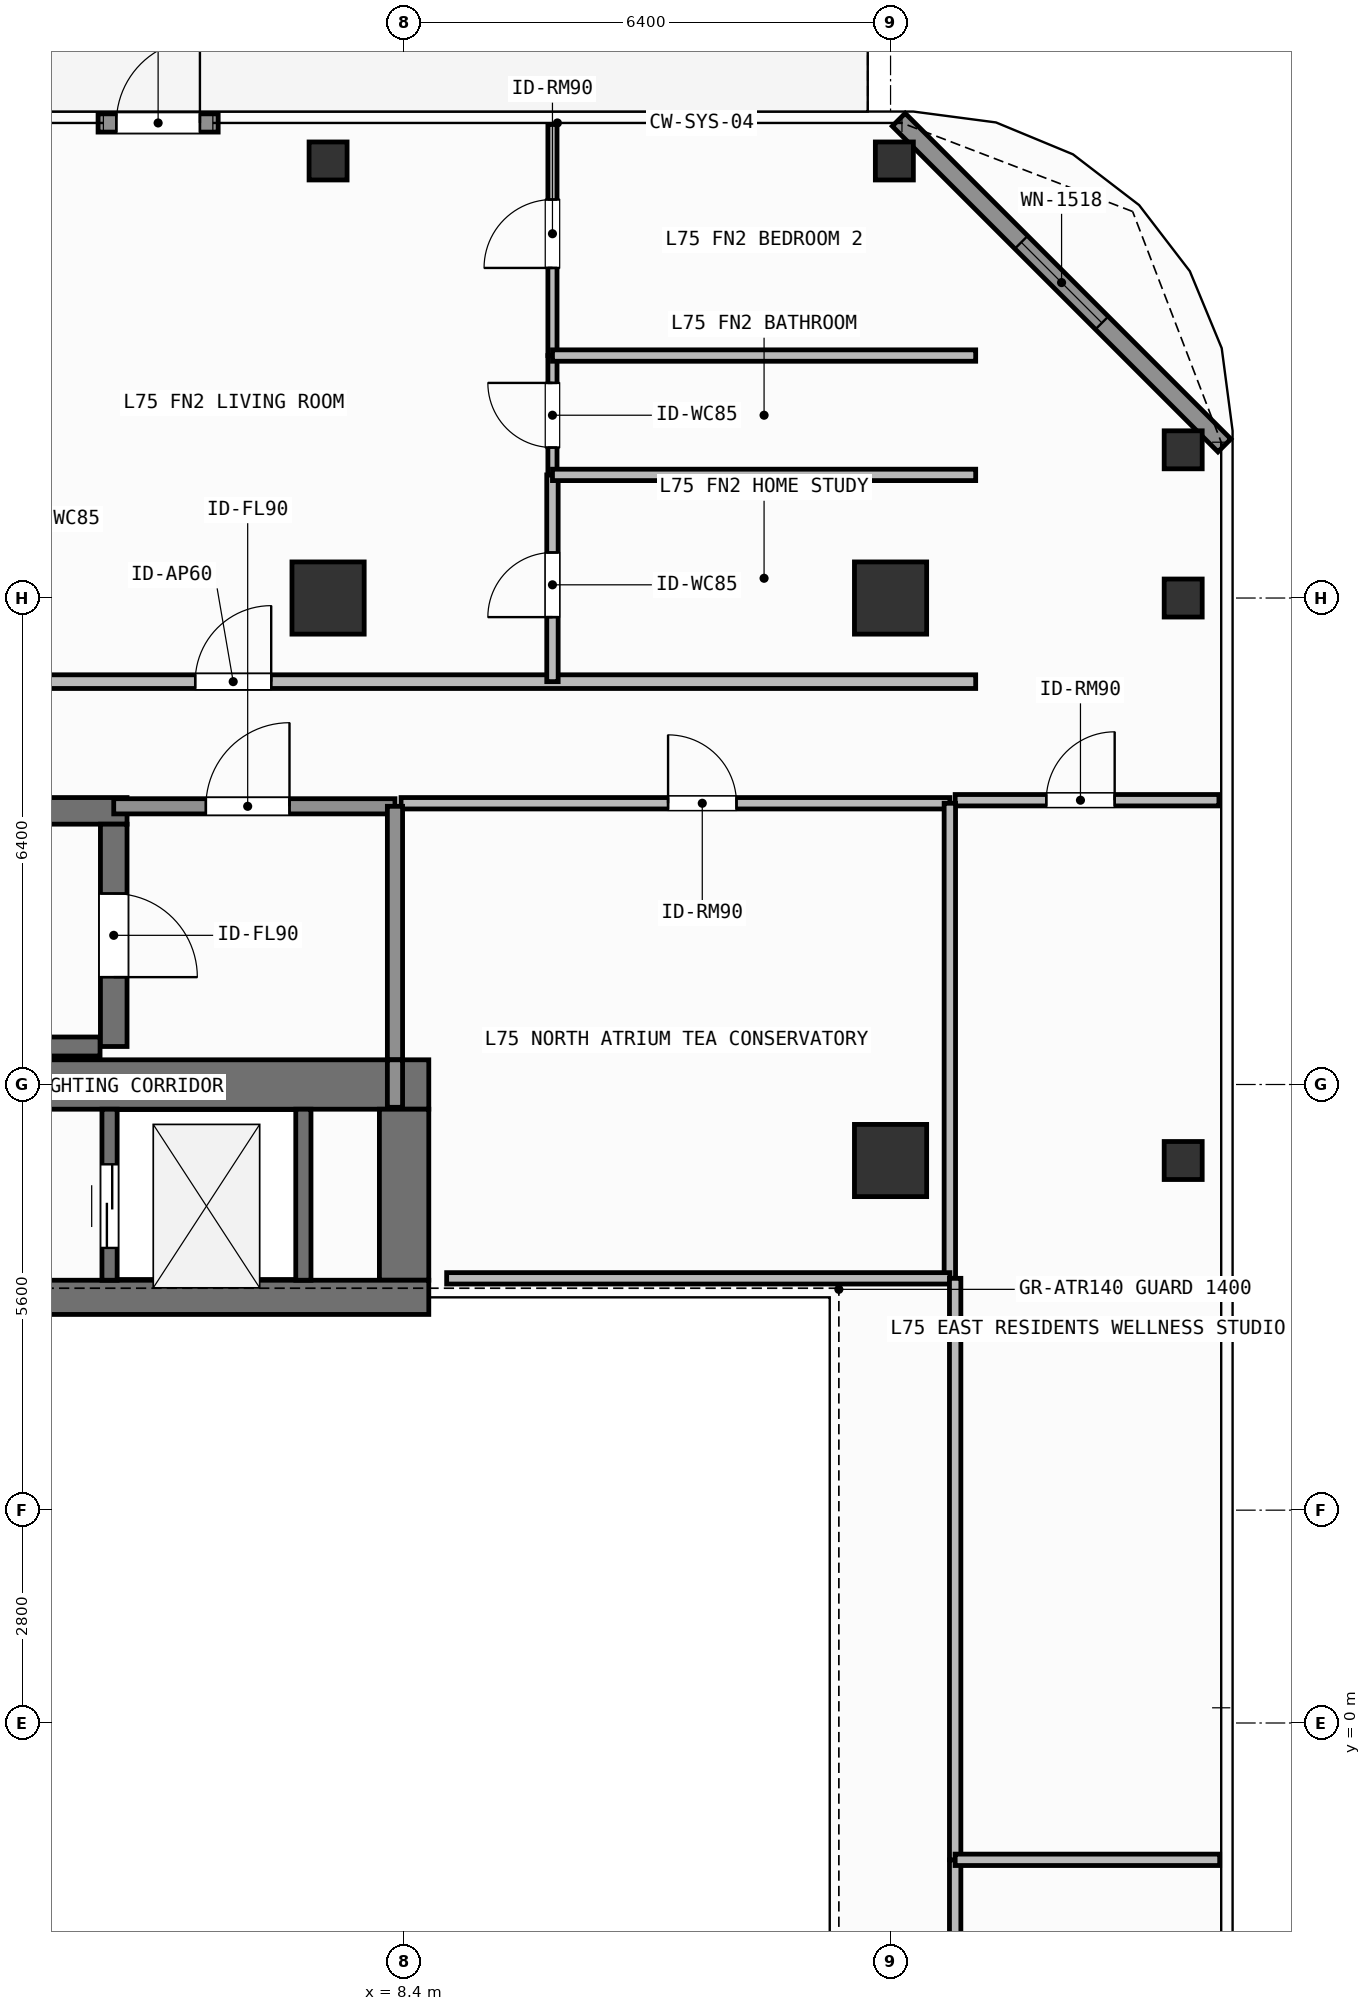
"""IFC4 building model, lengths in metres.
Left out: names, types, materials, properties, quantities, classifications, styles, units other than length and angle.
Written with IfcOpenShell. Run it as: python <this file> out.ifc"""

import sys

from ifc_helpers import new_model, si_unit, direction, frame, frame_2d, origin, origin_2d, place, context, subcontext, project, spatial, rectangle, hollow_rectangle, extrude, element, fill, save


model = new_model("IFC4")
c1 = context("Model", 3, precision=1e-05, world=origin(), true_north=direction((0.0, 1.0)))
c2 = subcontext(c1, "Body", "Model", "MODEL_VIEW")
j1 = project(units=[si_unit("LENGTHUNIT", "METRE"), si_unit("PLANEANGLEUNIT", "RADIAN")], contexts=[c1])
p1 = place(None, origin())
s1 = spatial("IfcSite", under=j1, at=p1, CompositionType="ELEMENT")
p2 = place(p1, origin())
s2 = spatial("IfcBuilding", under=s1, at=p2, CompositionType="ELEMENT")
p3 = place(p2, frame((0.0, 0.0, 305.4)))
s3 = spatial("IfcBuildingStorey", under=s2, at=p3, CompositionType="ELEMENT", Elevation=305.4)
p4 = place(p3, frame((-7.55, 8.4, 0.0), z_axis=(0.0, 0.0, 1.0), x_axis=(1.0, 0.0, 0.0)))
e1 = element("IfcWall", 1, at=p4, inside=s3, PredefinedType="SHEAR", context=c2, shape_type="SweptSolid", body=[
    extrude(rectangle(XDim=16.275, YDim=0.65, at=frame_2d((8.138, 0.0))), origin(), (0.0, 0.0, 1.0), 3.9),
])
p5 = place(p3, frame((8.4, 5.825, 0.0), z_axis=(0.0, 0.0, 1.0), x_axis=(0.0, 1.0, 0.0)))
e2 = element("IfcWall", 2, at=p5, inside=s3, PredefinedType="SHEAR", context=c2, shape_type="SweptSolid", body=[
    extrude(rectangle(XDim=2.25, YDim=0.65, at=frame_2d((1.125, 0.0))), origin(), (0.0, 0.0, 1.0), 3.9),
])
p6 = place(p3, frame((3.045, 5.6, 0.0), z_axis=(0.0, 0.0, 1.0), x_axis=(1.0, 0.0, 0.0)))
e3 = element("IfcWall", 3, at=p6, inside=s3, PredefinedType="SHEAR", context=c2, shape_type="SweptSolid", body=[
    extrude(rectangle(XDim=5.68, YDim=0.45, at=frame_2d((2.84, 0.0))), origin(), (0.0, 0.0, 1.0), 3.9),
])
p7 = place(p3, frame((-2.555, 12.0, 0.0), z_axis=(0.0, 0.0, 1.0), x_axis=(1.0, 0.0, 0.0)))
e4 = element("IfcWall", 4, at=p7, inside=s3, PredefinedType="SHEAR", context=c2, shape_type="SweptSolid", body=[
    extrude(rectangle(XDim=7.31, YDim=0.35, at=frame_2d((3.655, 0.0))), origin(), (0.0, 0.0, 1.0), 3.9),
])
p8 = place(p3, frame((-2.2, 8.9, 0.0), z_axis=(0.0, 0.0, 1.0), x_axis=(1.0, 0.0, 0.0)))
e5 = element("IfcWall", 5, at=p8, inside=s3, PredefinedType="SHEAR", context=c2, shape_type="SweptSolid", body=[
    extrude(rectangle(XDim=6.6, YDim=0.25, at=frame_2d((3.3, 0.0))), origin(), (0.0, 0.0, 1.0), 3.9),
])
p9 = place(p3, frame((4.58, 11.825, 0.0), z_axis=(0.0, 0.0, 1.0), x_axis=(0.0, -1.0, 0.0)))
e6 = element("IfcWall", 6, at=p9, inside=s3, PredefinedType="SHEAR", context=c2, shape_type="SweptSolid", body=[
    extrude(rectangle(XDim=2.925, YDim=0.35, at=frame_2d((1.462, 0.0))), origin(), (0.0, 0.0, 1.0), 3.9),
])
p10 = place(p9, frame((0.913, 0.0, 0.0)))
e7 = element("IfcOpeningElement", 7, at=p10, cuts=e6, PredefinedType="OPENING", context=c2, shape_type="SweptSolid", body=[
    extrude(rectangle(XDim=1.1, YDim=2.15, at=frame_2d((0.55, 1.075))), frame((0.0, 0.185, 0.0), z_axis=(0.0, -1.0, 0.0), x_axis=(1.0, 0.0, 0.0)), (0.0, 0.0, 1.0), 0.37),
])
for number, where, z_axis, x_axis in (
    (8, (7.4, 14.8, 0.0), (0.0, 0.0, 1.0), (1.0, 0.0, 0.0)),
    (9, (14.8, 14.8, 0.0), (0.0, 0.0, 1.0), (1.0, 0.0, 0.0)),
    (10, (14.8, 7.4, 0.0), (0.0, 0.0, 1.0), (1.0, 0.0, 0.0)),
):
    element("IfcColumn", number, at=place(p3, frame(where, z_axis=z_axis, x_axis=x_axis)), inside=s3, PredefinedType="COLUMN", context=c2, shape_type="SweptSolid", body=[
        extrude(rectangle(XDim=0.95, YDim=0.95, at=origin_2d()), origin(), (0.0, 0.0, 1.0), 3.9),
    ])
for number, where, z_axis, x_axis in (
    (11, (14.85, 20.55, 0.0), (0.0, 0.0, 1.0), (1.0, 0.0, 0.0)),
    (12, (18.65, 16.75, 0.0), (0.0, 0.0, 1.0), (1.0, 0.0, 0.0)),
    (13, (7.4, 20.55, 0.0), (0.0, 0.0, 1.0), (1.0, 0.0, 0.0)),
    (14, (18.65, 7.4, 0.0), (0.0, 0.0, 1.0), (1.0, 0.0, 0.0)),
    (15, (18.65, 14.8, 0.0), (0.0, 0.0, 1.0), (1.0, 0.0, 0.0)),
):
    element("IfcColumn", number, at=place(p3, frame(where, z_axis=z_axis, x_axis=x_axis)), inside=s3, PredefinedType="COLUMN", context=c2, shape_type="SweptSolid", body=[
        extrude(hollow_rectangle(XDim=0.5, YDim=0.5, WallThickness=0.025, at=origin_2d()), origin(), (0.0, 0.0, 1.0), 3.9),
    ])
p11 = place(p3, frame((4.374, 21.05, 0.0), z_axis=(0.0, 0.0, 1.0), x_axis=(1.0, 0.0, 0.0)))
e16 = element("IfcWall", 16, at=p11, inside=s3, PredefinedType="SOLIDWALL", context=c2, shape_type="SweptSolid", body=[
    extrude(rectangle(XDim=1.58, YDim=0.24, at=frame_2d((0.79, 0.0))), origin(), (0.0, 0.0, 1.0), 3.68),
])
p12 = place(p11, frame((0.24, 0.0, 0.0)))
e17 = element("IfcOpeningElement", 17, at=p12, cuts=e16, PredefinedType="OPENING", context=c2, shape_type="SweptSolid", body=[
    extrude(rectangle(XDim=1.1, YDim=2.2, at=frame_2d((0.55, 1.1))), frame((0.0, 0.13, 0.0), z_axis=(0.0, -1.0, 0.0), x_axis=(1.0, 0.0, 0.0)), (0.0, 0.0, 1.0), 0.26),
])
p13 = place(p3, frame((14.908, 21.092, 0.0), z_axis=(0.0, 0.0, 1.0), x_axis=(0.707106781187, -0.707106781187, 0.0)))
e18 = element("IfcWall", 18, at=p13, inside=s3, PredefinedType="SOLIDWALL", context=c2, shape_type="SweptSolid", body=[
    extrude(rectangle(XDim=6.059, YDim=0.24, at=frame_2d((3.03, 0.0))), origin(), (0.0, 0.0, 1.0), 3.68),
])
p14 = place(p13, frame((2.28, 0.0, 0.8)))
e19 = element("IfcOpeningElement", 19, at=p14, cuts=e18, PredefinedType="OPENING", context=c2, shape_type="SweptSolid", body=[
    extrude(rectangle(XDim=1.5, YDim=1.85, at=frame_2d((0.75, 0.925))), frame((0.0, 0.13, 0.0), z_axis=(0.0, -1.0, 0.0), x_axis=(1.0, 0.0, 0.0)), (0.0, 0.0, 1.0), 0.26),
])
p15 = place(p3, frame((4.525, 5.825, 0.0), z_axis=(0.0, 0.0, 1.0), x_axis=(0.0, 1.0, 0.0)))
e20 = element("IfcWall", 20, at=p15, inside=s3, PredefinedType="SHEAR", context=c2, shape_type="SweptSolid", body=[
    extrude(rectangle(XDim=2.25, YDim=0.2, at=frame_2d((1.125, 0.0))), origin(), (0.0, 0.0, 1.0), 3.68),
])
p16 = place(p15, frame((0.425, 0.0, 0.0)))
e21 = element("IfcOpeningElement", 21, at=p16, cuts=e20, PredefinedType="OPENING", context=c2, shape_type="SweptSolid", body=[
    extrude(rectangle(XDim=1.1, YDim=2.2, at=frame_2d((0.55, 1.1))), frame((0.0, 0.11, 0.0), z_axis=(0.0, -1.0, 0.0), x_axis=(1.0, 0.0, 0.0)), (0.0, 0.0, 1.0), 0.22),
])
p17 = place(p3, frame((7.075, 5.825, 0.0), z_axis=(0.0, 0.0, 1.0), x_axis=(0.0, 1.0, 0.0)))
e22 = element("IfcWall", 22, at=p17, inside=s3, PredefinedType="SHEAR", context=c2, shape_type="SweptSolid", body=[
    extrude(rectangle(XDim=2.25, YDim=0.2, at=frame_2d((1.125, 0.0))), origin(), (0.0, 0.0, 1.0), 3.68),
])
p18 = place(p3, frame((4.58, 12.06, 0.0), z_axis=(0.0, 0.0, 1.0), x_axis=(1.0, 0.0, 0.0)))
e23 = element("IfcWall", 23, at=p18, inside=s3, PredefinedType="SOLIDWALL", context=c2, shape_type="SweptSolid", body=[
    extrude(rectangle(XDim=3.7, YDim=0.2, at=frame_2d((1.85, 0.0))), origin(), (0.0, 0.0, 1.0), 3.68),
])
p19 = place(p18, frame((1.212, 0.0, 0.0)))
e24 = element("IfcOpeningElement", 24, at=p19, cuts=e23, PredefinedType="OPENING", context=c2, shape_type="SweptSolid", body=[
    extrude(rectangle(XDim=1.1, YDim=2.15, at=frame_2d((0.55, 1.075))), frame((0.0, 0.11, 0.0), z_axis=(0.0, -1.0, 0.0), x_axis=(1.0, 0.0, 0.0)), (0.0, 0.0, 1.0), 0.22),
])
p20 = place(p3, frame((8.36, 12.1, 0.0), z_axis=(0.0, 0.0, 1.0), x_axis=(1.0, 0.0, 0.0)))
e25 = element("IfcWall", 25, at=p20, inside=s3, PredefinedType="PARTITIONING", context=c2, shape_type="SweptSolid", body=[
    extrude(rectangle(XDim=7.22, YDim=0.15, at=frame_2d((3.61, 0.0))), origin(), (0.0, 0.0, 1.0), 3.68),
])
p21 = place(p20, frame((3.513, 0.0, 0.0)))
e26 = element("IfcOpeningElement", 26, at=p21, cuts=e25, PredefinedType="OPENING", context=c2, shape_type="SweptSolid", body=[
    extrude(rectangle(XDim=0.9, YDim=2.1, at=frame_2d((0.45, 1.05))), frame((0.0, 0.085, 0.0), z_axis=(0.0, -1.0, 0.0), x_axis=(1.0, 0.0, 0.0)), (0.0, 0.0, 1.0), 0.17),
])
p22 = place(p3, frame((-5.224, 13.7, 0.0), z_axis=(0.0, 0.0, 1.0), x_axis=(1.0, 0.0, 0.0)))
e27 = element("IfcWall", 27, at=p22, inside=s3, PredefinedType="PARTITIONING", context=c2, shape_type="SweptSolid", body=[
    extrude(rectangle(XDim=21.144, YDim=0.18, at=frame_2d((10.572, 0.0))), origin(), (0.0, 0.0, 1.0), 3.68),
])
p23 = place(p22, frame((10.876, 0.0, 0.0)))
e28 = element("IfcOpeningElement", 28, at=p23, cuts=e27, PredefinedType="OPENING", context=c2, shape_type="SweptSolid", body=[
    extrude(rectangle(XDim=1.0, YDim=2.2, at=frame_2d((0.5, 1.1))), frame((0.0, 0.1, 0.0), z_axis=(0.0, -1.0, 0.0), x_axis=(1.0, 0.0, 0.0)), (0.0, 0.0, 1.0), 0.2),
])
p24 = place(p3, frame((10.352, 13.7, 0.0), z_axis=(0.0, 0.0, 1.0), x_axis=(0.0, 1.0, 0.0)))
e29 = element("IfcWall", 29, at=p24, inside=s3, PredefinedType="PARTITIONING", context=c2, shape_type="SweptSolid", body=[
    extrude(rectangle(XDim=2.72, YDim=0.15, at=frame_2d((1.36, 0.0))), origin(), (0.0, 0.0, 1.0), 3.68),
])
p25 = place(p24, frame((0.849, 0.0, 0.0)))
e30 = element("IfcOpeningElement", 30, at=p25, cuts=e29, PredefinedType="OPENING", context=c2, shape_type="SweptSolid", body=[
    extrude(rectangle(XDim=0.85, YDim=2.1, at=frame_2d((0.425, 1.05))), frame((0.0, 0.085, 0.0), z_axis=(0.0, -1.0, 0.0), x_axis=(1.0, 0.0, 0.0)), (0.0, 0.0, 1.0), 0.17),
])
p26 = place(p3, frame((10.352, 16.42, 0.0), z_axis=(0.0, 0.0, 1.0), x_axis=(0.0, 1.0, 0.0)))
e31 = element("IfcWall", 31, at=p26, inside=s3, PredefinedType="PARTITIONING", context=c2, shape_type="SweptSolid", body=[
    extrude(rectangle(XDim=1.57, YDim=0.12, at=frame_2d((0.785, 0.0))), origin(), (0.0, 0.0, 1.0), 3.68),
])
p27 = place(p26, frame((0.36, 0.0, 0.0)))
e32 = element("IfcOpeningElement", 32, at=p27, cuts=e31, PredefinedType="OPENING", context=c2, shape_type="SweptSolid", body=[
    extrude(rectangle(XDim=0.85, YDim=2.1, at=frame_2d((0.425, 1.05))), frame((0.0, 0.07, 0.0), z_axis=(0.0, -1.0, 0.0), x_axis=(1.0, 0.0, 0.0)), (0.0, 0.0, 1.0), 0.14),
])
p28 = place(p3, frame((10.352, 17.99, 0.0), z_axis=(0.0, 0.0, 1.0), x_axis=(0.0, 1.0, 0.0)))
e33 = element("IfcWall", 33, at=p28, inside=s3, PredefinedType="PARTITIONING", context=c2, shape_type="SweptSolid", body=[
    extrude(rectangle(XDim=3.04, YDim=0.12, at=frame_2d((1.52, 0.0))), origin(), (0.0, 0.0, 1.0), 3.68),
])
p29 = place(p28, frame((1.153, 0.0, 0.0)))
e34 = element("IfcOpeningElement", 34, at=p29, cuts=e33, PredefinedType="OPENING", context=c2, shape_type="SweptSolid", body=[
    extrude(rectangle(XDim=0.9, YDim=2.1, at=frame_2d((0.45, 1.05))), frame((0.0, 0.07, 0.0), z_axis=(0.0, -1.0, 0.0), x_axis=(1.0, 0.0, 0.0)), (0.0, 0.0, 1.0), 0.14),
])
p30 = place(p3, frame((15.65, 12.14, 0.0), z_axis=(0.0, 0.0, 1.0), x_axis=(1.0, 0.0, 0.0)))
e35 = element("IfcWall", 35, at=p30, inside=s3, PredefinedType="PARTITIONING", context=c2, shape_type="SweptSolid", body=[
    extrude(rectangle(XDim=3.47, YDim=0.15, at=frame_2d((1.735, 0.0))), origin(), (0.0, 0.0, 1.0), 3.68),
])
p31 = place(p30, frame((1.198, 0.0, 0.0)))
e36 = element("IfcOpeningElement", 36, at=p31, cuts=e35, PredefinedType="OPENING", context=c2, shape_type="SweptSolid", body=[
    extrude(rectangle(XDim=0.9, YDim=2.1, at=frame_2d((0.45, 1.05))), frame((0.0, 0.085, 0.0), z_axis=(0.0, -1.0, 0.0), x_axis=(1.0, 0.0, 0.0)), (0.0, 0.0, 1.0), 0.17),
])
p32 = place(p3, frame((8.28, 8.725, 0.0), z_axis=(0.0, 0.0, 1.0), x_axis=(0.0, 1.0, 0.0)))
e37 = element("IfcWall", 37, at=p32, inside=s3, PredefinedType="SOLIDWALL", context=c2, shape_type="SweptSolid", body=[
    extrude(rectangle(XDim=3.335, YDim=0.2, at=frame_2d((1.667, 0.0))), origin(), (0.0, 0.0, 1.0), 3.68),
])
p33 = place(p3, frame((8.28, 8.1, 0.0), z_axis=(0.0, 0.0, 1.0), x_axis=(0.0, 1.0, 0.0)))
e38 = element("IfcWall", 38, at=p33, inside=s3, PredefinedType="SOLIDWALL", context=c2, shape_type="SweptSolid", body=[
    extrude(rectangle(XDim=0.625, YDim=0.2, at=frame_2d((0.312, 0.0))), origin(), (0.0, 0.0, 1.0), 3.68),
])
p34 = place(p3, frame((15.58, 5.85, 0.0), z_axis=(0.0, 0.0, 1.0), x_axis=(0.0, 1.0, 0.0)))
e39 = element("IfcWall", 39, at=p34, inside=s3, PredefinedType="PARTITIONING", context=c2, shape_type="SweptSolid", body=[
    extrude(rectangle(XDim=6.25, YDim=0.15, at=frame_2d((3.125, 0.0))), origin(), (0.0, 0.0, 1.0), 3.68),
])
p35 = place(p3, frame((8.96, 5.85, 0.0), z_axis=(0.0, 0.0, 1.0), x_axis=(1.0, 0.0, 0.0)))
e40 = element("IfcWall", 40, at=p35, inside=s3, PredefinedType="PARTITIONING", context=c2, shape_type="SweptSolid", body=[
    extrude(rectangle(XDim=6.62, YDim=0.15, at=frame_2d((3.31, 0.0))), origin(), (0.0, 0.0, 1.0), 3.68),
])
for number, where, z_axis, x_axis in (
    (41, (10.352, 16.42, 0.0), (0.0, 0.0, 1.0), (1.0, 0.0, 0.0)),
    (42, (10.352, 17.99, 0.0), (0.0, 0.0, 1.0), (1.0, 0.0, 0.0)),
):
    element("IfcWall", number, at=place(p3, frame(where, z_axis=z_axis, x_axis=x_axis)), inside=s3, PredefinedType="PARTITIONING", context=c2, shape_type="SweptSolid", body=[
        extrude(rectangle(XDim=5.568, YDim=0.15, at=frame_2d((2.784, 0.0))), origin(), (0.0, 0.0, 1.0), 3.68),
    ])
p36 = place(p3, frame((15.65, -5.85, 0.0), z_axis=(0.0, 0.0, 1.0), x_axis=(0.0, 1.0, 0.0)))
e43 = element("IfcWall", 43, at=p36, inside=s3, PredefinedType="PARTITIONING", context=c2, shape_type="SweptSolid", body=[
    extrude(rectangle(XDim=4.05, YDim=0.15, at=frame_2d((2.025, 0.0))), origin(), (0.0, 0.0, 1.0), 3.68),
])
p37 = place(p3, frame((15.65, -1.8, 0.0), z_axis=(0.0, 0.0, 1.0), x_axis=(0.0, 1.0, 0.0)))
e44 = element("IfcWall", 44, at=p37, inside=s3, PredefinedType="PARTITIONING", context=c2, shape_type="SweptSolid", body=[
    extrude(rectangle(XDim=7.65, YDim=0.15, at=frame_2d((3.825, 0.0))), origin(), (0.0, 0.0, 1.0), 3.68),
])
p38 = place(p3, frame((15.65, -1.8, 0.0), z_axis=(0.0, 0.0, 1.0), x_axis=(1.0, 0.0, 0.0)))
e45 = element("IfcWall", 45, at=p38, inside=s3, PredefinedType="PARTITIONING", context=c2, shape_type="SweptSolid", body=[
    extrude(rectangle(XDim=3.48, YDim=0.15, at=frame_2d((1.74, 0.0))), origin(), (0.0, 0.0, 1.0), 3.68),
])
p39 = place(p12, origin())
e46 = element("IfcDoor", 46, at=p39, inside=s3, OperationType="SINGLE_SWING_RIGHT", PredefinedType="DOOR", context=c2, shape_type="SweptSolid", body=[
    extrude(rectangle(XDim=1.1, YDim=2.2, at=frame_2d((0.55, 1.1))), frame((0.0, 0.025, 0.0), z_axis=(0.0, -1.0, 0.0), x_axis=(1.0, 0.0, 0.0)), (0.0, 0.0, 1.0), 0.05),
])
fill(e17, e46)
p40 = place(p14, origin())
e47 = element("IfcWindow", 47, at=p40, inside=s3, PartitioningType="SINGLE_PANEL", PredefinedType="WINDOW", context=c2, shape_type="SweptSolid", body=[
    extrude(rectangle(XDim=1.5, YDim=1.85, at=frame_2d((0.75, 0.925))), frame((0.0, 0.03, 0.0), z_axis=(0.0, -1.0, 0.0), x_axis=(1.0, 0.0, 0.0)), (0.0, 0.0, 1.0), 0.06),
])
fill(e19, e47)
p41 = place(p16, origin())
e48 = element("IfcDoor", 48, at=p41, inside=s3, OperationType="SLIDING_TO_LEFT", PredefinedType="DOOR", context=c2, shape_type="SweptSolid", body=[
    extrude(rectangle(XDim=1.1, YDim=2.2, at=frame_2d((0.55, 1.1))), frame((0.0, 0.025, 0.0), z_axis=(0.0, -1.0, 0.0), x_axis=(1.0, 0.0, 0.0)), (0.0, 0.0, 1.0), 0.05),
])
fill(e21, e48)
p42 = place(p10, origin())
e49 = element("IfcDoor", 49, at=p42, inside=s3, OperationType="SINGLE_SWING_RIGHT", PredefinedType="DOOR", context=c2, shape_type="SweptSolid", body=[
    extrude(rectangle(XDim=1.1, YDim=2.15, at=frame_2d((0.55, 1.075))), frame((0.0, 0.025, 0.0), z_axis=(0.0, -1.0, 0.0), x_axis=(1.0, 0.0, 0.0)), (0.0, 0.0, 1.0), 0.05),
])
fill(e7, e49)
p43 = place(p19, origin())
e50 = element("IfcDoor", 50, at=p43, inside=s3, OperationType="SINGLE_SWING_RIGHT", PredefinedType="DOOR", context=c2, shape_type="SweptSolid", body=[
    extrude(rectangle(XDim=1.1, YDim=2.15, at=frame_2d((0.55, 1.075))), frame((0.0, 0.025, 0.0), z_axis=(0.0, -1.0, 0.0), x_axis=(1.0, 0.0, 0.0)), (0.0, 0.0, 1.0), 0.05),
])
fill(e24, e50)
p44 = place(p21, origin())
e51 = element("IfcDoor", 51, at=p44, inside=s3, OperationType="SINGLE_SWING_LEFT", PredefinedType="DOOR", context=c2, shape_type="SweptSolid", body=[
    extrude(rectangle(XDim=0.9, YDim=2.1, at=frame_2d((0.45, 1.05))), frame((0.0, 0.025, 0.0), z_axis=(0.0, -1.0, 0.0), x_axis=(1.0, 0.0, 0.0)), (0.0, 0.0, 1.0), 0.05),
])
fill(e26, e51)
p45 = place(p23, origin())
e52 = element("IfcDoor", 52, at=p45, inside=s3, OperationType="SINGLE_SWING_RIGHT", PredefinedType="DOOR", context=c2, shape_type="SweptSolid", body=[
    extrude(rectangle(XDim=1.0, YDim=2.2, at=frame_2d((0.5, 1.1))), frame((0.0, 0.025, 0.0), z_axis=(0.0, -1.0, 0.0), x_axis=(1.0, 0.0, 0.0)), (0.0, 0.0, 1.0), 0.05),
])
fill(e28, e52)
p46 = place(p25, origin())
e53 = element("IfcDoor", 53, at=p46, inside=s3, OperationType="SINGLE_SWING_LEFT", PredefinedType="DOOR", context=c2, shape_type="SweptSolid", body=[
    extrude(rectangle(XDim=0.85, YDim=2.1, at=frame_2d((0.425, 1.05))), frame((0.0, 0.025, 0.0), z_axis=(0.0, -1.0, 0.0), x_axis=(1.0, 0.0, 0.0)), (0.0, 0.0, 1.0), 0.05),
])
fill(e30, e53)
p47 = place(p27, origin())
e54 = element("IfcDoor", 54, at=p47, inside=s3, OperationType="SINGLE_SWING_RIGHT", PredefinedType="DOOR", context=c2, shape_type="SweptSolid", body=[
    extrude(rectangle(XDim=0.85, YDim=2.1, at=frame_2d((0.425, 1.05))), frame((0.0, 0.025, 0.0), z_axis=(0.0, -1.0, 0.0), x_axis=(1.0, 0.0, 0.0)), (0.0, 0.0, 1.0), 0.05),
])
fill(e32, e54)
p48 = place(p29, origin())
e55 = element("IfcDoor", 55, at=p48, inside=s3, OperationType="SINGLE_SWING_LEFT", PredefinedType="DOOR", context=c2, shape_type="SweptSolid", body=[
    extrude(rectangle(XDim=0.9, YDim=2.1, at=frame_2d((0.45, 1.05))), frame((0.0, 0.025, 0.0), z_axis=(0.0, -1.0, 0.0), x_axis=(1.0, 0.0, 0.0)), (0.0, 0.0, 1.0), 0.05),
])
fill(e34, e55)
p49 = place(p31, origin())
e56 = element("IfcDoor", 56, at=p49, inside=s3, OperationType="SINGLE_SWING_RIGHT", PredefinedType="DOOR", context=c2, shape_type="SweptSolid", body=[
    extrude(rectangle(XDim=0.9, YDim=2.1, at=frame_2d((0.45, 1.05))), frame((0.0, 0.025, 0.0), z_axis=(0.0, -1.0, 0.0), x_axis=(1.0, 0.0, 0.0)), (0.0, 0.0, 1.0), 0.05),
])
fill(e36, e56)
save(model, sys.argv[1])
